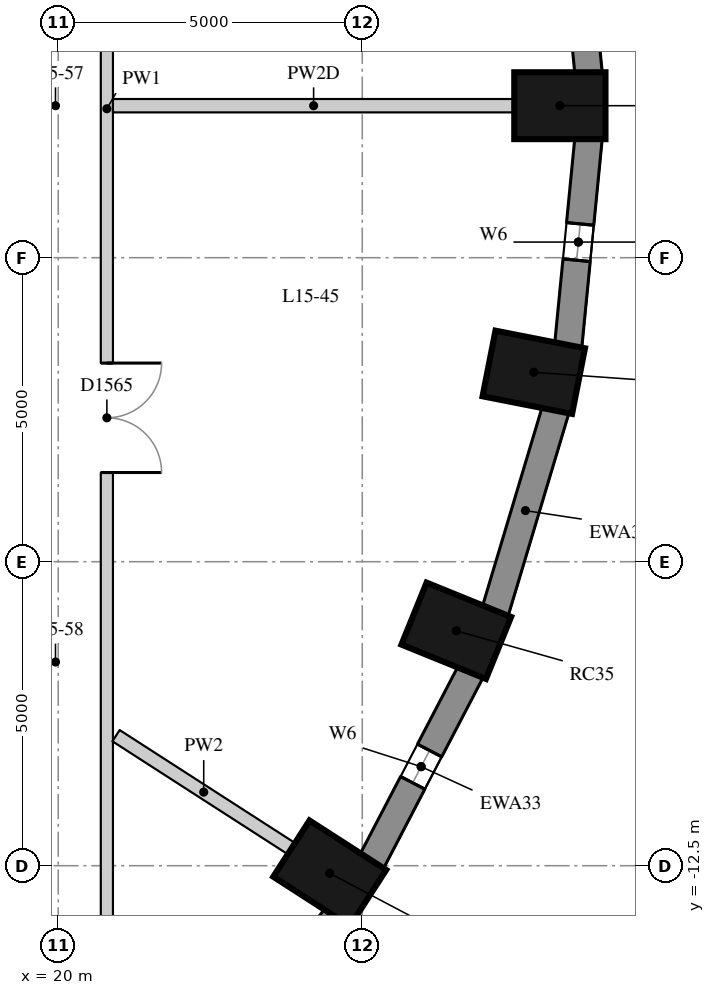
"""IFC4 building model, lengths in metres.
Left out: names, types, materials, properties, quantities, classifications, styles, units other than length and angle.
Written with IfcOpenShell. Run it as: python <this file> out.ifc"""

import sys

from ifc_helpers import new_model, si_unit, direction, frame, frame_2d, origin, origin_2d, place, context, subcontext, project, spatial, rectangle, extrude, element, fill, save


model = new_model("IFC4")
c1 = context("Model", 3, precision=1e-05, world=origin(), true_north=direction((0.0, 1.0)))
c2 = subcontext(c1, "Body", "Model", "MODEL_VIEW")
j1 = project(units=[si_unit("LENGTHUNIT", "METRE"), si_unit("PLANEANGLEUNIT", "RADIAN")], contexts=[c1])
p1 = place(None, origin())
s1 = spatial("IfcSite", under=j1, at=p1, CompositionType="ELEMENT")
p2 = place(p1, origin())
s2 = spatial("IfcBuilding", under=s1, at=p2, CompositionType="ELEMENT")
p3 = place(p2, frame((0.0, 0.0, 58.0)))
s3 = spatial("IfcBuildingStorey", under=s2, at=p3, CompositionType="ELEMENT", Elevation=58.0)
for number, where, z_axis, x_axis in (
    (1, (28.25, 0.0, 0.0), (0.0, 0.0, 1.0), (1.0, 0.0, 0.0)),
    (2, (24.465, -12.625, 0.0), (0.0, 0.0, 1.0), (0.841, -0.541, 0.0)),
    (3, (26.546, -8.636, 0.0), (0.0, 0.0, 1.0), (0.927, -0.376, 0.0)),
    (4, (27.821, -4.385, 0.0), (0.0, 0.0, 1.0), (0.981, -0.193, 0.0)),
):
    element("IfcColumn", number, at=place(p3, frame(where, z_axis=z_axis, x_axis=x_axis)), inside=s3, PredefinedType="COLUMN", context=c2, shape_type="SweptSolid", body=[
        extrude(rectangle(XDim=1.5, YDim=1.1, at=origin_2d()), origin(), (0.0, 0.0, 1.0), 3.3),
    ])
p4 = place(p3, frame((28.722, 0.53, 0.0), z_axis=(0.0, 0.0, 1.0), x_axis=(-0.097389581596, 0.995246336038, 0.0)))
e5 = element("IfcWall", 5, at=p4, inside=s3, PredefinedType="SOLIDWALL", context=c2, shape_type="SweptSolid", body=[
    extrude(rectangle(XDim=3.442, YDim=0.45, at=frame_2d((1.721, 0.0))), origin(), (0.0, 0.0, 1.0), 3.02),
])
p5 = place(p3, frame((22.352, -16.17, 0.0), z_axis=(0.0, 0.0, 1.0), x_axis=(0.616661975264, 0.787228053529, 0.0)))
e6 = element("IfcWall", 6, at=p5, inside=s3, PredefinedType="SOLIDWALL", context=c2, shape_type="SweptSolid", body=[
    extrude(rectangle(XDim=3.61, YDim=0.45, at=frame_2d((1.805, 0.0))), origin(), (0.0, 0.0, 1.0), 3.02),
])
p6 = place(p3, frame((25.152, -12.437, 0.0), z_axis=(0.0, 0.0, 1.0), x_axis=(0.462492775226, 0.886623050041, 0.0)))
e7 = element("IfcWall", 7, at=p6, inside=s3, PredefinedType="SOLIDWALL", context=c2, shape_type="SweptSolid", body=[
    extrude(rectangle(XDim=3.532, YDim=0.45, at=frame_2d((1.766, 0.0))), origin(), (0.0, 0.0, 1.0), 3.02),
])
p7 = place(p6, frame((1.466, 0.0, 0.4)))
e8 = element("IfcOpeningElement", 8, at=p7, cuts=e7, PredefinedType="OPENING", context=c2, shape_type="SweptSolid", body=[
    extrude(rectangle(XDim=0.6, YDim=1.75, at=frame_2d((0.3, 0.875))), frame((0.0, 0.235, 0.0), z_axis=(0.0, -1.0, 0.0), x_axis=(1.0, 0.0, 0.0)), (0.0, 0.0, 1.0), 0.47),
])
p8 = place(p3, frame((27.185, -8.323, 0.0), z_axis=(0.0, 0.0, 1.0), x_axis=(0.287064133733, 0.957911364963, 0.0)))
e9 = element("IfcWall", 9, at=p8, inside=s3, PredefinedType="SOLIDWALL", context=c2, shape_type="SweptSolid", body=[
    extrude(rectangle(XDim=3.473, YDim=0.45, at=frame_2d((1.737, 0.0))), origin(), (0.0, 0.0, 1.0), 3.02),
])
p9 = place(p3, frame((28.387, -3.956, 0.0), z_axis=(0.0, 0.0, 1.0), x_axis=(0.097389581596, 0.995246336038, 0.0)))
e10 = element("IfcWall", 10, at=p9, inside=s3, PredefinedType="SOLIDWALL", context=c2, shape_type="SweptSolid", body=[
    extrude(rectangle(XDim=3.442, YDim=0.45, at=frame_2d((1.721, 0.0))), origin(), (0.0, 0.0, 1.0), 3.02),
])
p10 = place(p9, frame((1.421, 0.0, 0.4)))
e11 = element("IfcOpeningElement", 11, at=p10, cuts=e10, PredefinedType="OPENING", context=c2, shape_type="SweptSolid", body=[
    extrude(rectangle(XDim=0.6, YDim=1.75, at=frame_2d((0.3, 0.875))), frame((0.0, 0.235, 0.0), z_axis=(0.0, -1.0, 0.0), x_axis=(1.0, 0.0, 0.0)), (0.0, 0.0, 1.0), 0.47),
])
p11 = place(p3, frame((20.8, 13.5, 0.0), z_axis=(0.0, 0.0, 1.0), x_axis=(0.0, -1.0, 0.0)))
e12 = element("IfcWall", 12, at=p11, inside=s3, PredefinedType="PARTITIONING", context=c2, shape_type="SweptSolid", body=[
    extrude(rectangle(XDim=27.1, YDim=0.2, at=frame_2d((13.55, 0.0))), origin(), (0.0, 0.0, 1.0), 3.02),
])
p12 = place(p11, frame((17.733, 0.0, 0.0)))
e13 = element("IfcOpeningElement", 13, at=p12, cuts=e12, PredefinedType="OPENING", context=c2, shape_type="SweptSolid", body=[
    extrude(rectangle(XDim=1.8, YDim=2.1, at=frame_2d((0.9, 1.05))), frame((0.0, 0.11, 0.0), z_axis=(0.0, -1.0, 0.0), x_axis=(1.0, 0.0, 0.0)), (0.0, 0.0, 1.0), 0.22),
])
p13 = place(p11, frame((9.448, 0.0, 0.0)))
e14 = element("IfcOpeningElement", 14, at=p13, cuts=e12, PredefinedType="OPENING", context=c2, shape_type="SweptSolid", body=[
    extrude(rectangle(XDim=1.8, YDim=2.1, at=frame_2d((0.9, 1.05))), frame((0.0, 0.11, 0.0), z_axis=(0.0, -1.0, 0.0), x_axis=(1.0, 0.0, 0.0)), (0.0, 0.0, 1.0), 0.22),
])
p14 = place(p11, frame((2.704, 0.0, 0.0)))
e15 = element("IfcOpeningElement", 15, at=p14, cuts=e12, PredefinedType="OPENING", context=c2, shape_type="SweptSolid", body=[
    extrude(rectangle(XDim=1.8, YDim=2.1, at=frame_2d((0.9, 1.05))), frame((0.0, 0.11, 0.0), z_axis=(0.0, -1.0, 0.0), x_axis=(1.0, 0.0, 0.0)), (0.0, 0.0, 1.0), 0.22),
])
p15 = place(p3, frame((27.5, 0.0, 0.0), z_axis=(0.0, 0.0, 1.0), x_axis=(-1.0, 0.0, 0.0)))
e16 = element("IfcWall", 16, at=p15, inside=s3, PredefinedType="PARTITIONING", context=c2, shape_type="SweptSolid", body=[
    extrude(rectangle(XDim=6.6, YDim=0.22, at=frame_2d((3.3, 0.0))), origin(), (0.0, 0.0, 1.0), 2.47),
])
p16 = place(p3, frame((23.835, -12.219, 0.0), z_axis=(0.0, 0.0, 1.0), x_axis=(-0.840694872373, 0.541509124176, 0.0)))
e17 = element("IfcWall", 17, at=p16, inside=s3, PredefinedType="PARTITIONING", context=c2, shape_type="SweptSolid", body=[
    extrude(rectangle(XDim=3.43, YDim=0.22, at=frame_2d((1.715, 0.0))), origin(), (0.0, 0.0, 1.0), 3.02),
])
p17 = place(p7, origin())
e18 = element("IfcWindow", 18, at=p17, inside=s3, PartitioningType="SINGLE_PANEL", PredefinedType="WINDOW", context=c2, shape_type="SweptSolid", body=[
    extrude(rectangle(XDim=0.6, YDim=1.75, at=frame_2d((0.3, 0.875))), frame((0.0, 0.035, 0.0), z_axis=(0.0, -1.0, 0.0), x_axis=(1.0, 0.0, 0.0)), (0.0, 0.0, 1.0), 0.06),
])
fill(e8, e18)
p18 = place(p10, origin())
e19 = element("IfcWindow", 19, at=p18, inside=s3, PartitioningType="SINGLE_PANEL", PredefinedType="WINDOW", context=c2, shape_type="SweptSolid", body=[
    extrude(rectangle(XDim=0.6, YDim=1.75, at=frame_2d((0.3, 0.875))), frame((0.0, 0.035, 0.0), z_axis=(0.0, -1.0, 0.0), x_axis=(1.0, 0.0, 0.0)), (0.0, 0.0, 1.0), 0.06),
])
fill(e11, e19)
p19 = place(p12, origin())
e20 = element("IfcDoor", 20, at=p19, inside=s3, OperationType="DOUBLE_DOOR_SINGLE_SWING", PredefinedType="DOOR", context=c2, shape_type="SweptSolid", body=[
    extrude(rectangle(XDim=1.8, YDim=2.1, at=frame_2d((0.9, 1.05))), frame((0.0, 0.025, 0.0), z_axis=(0.0, -1.0, 0.0), x_axis=(1.0, 0.0, 0.0)), (0.0, 0.0, 1.0), 0.05),
])
fill(e13, e20)
save(model, sys.argv[1])
